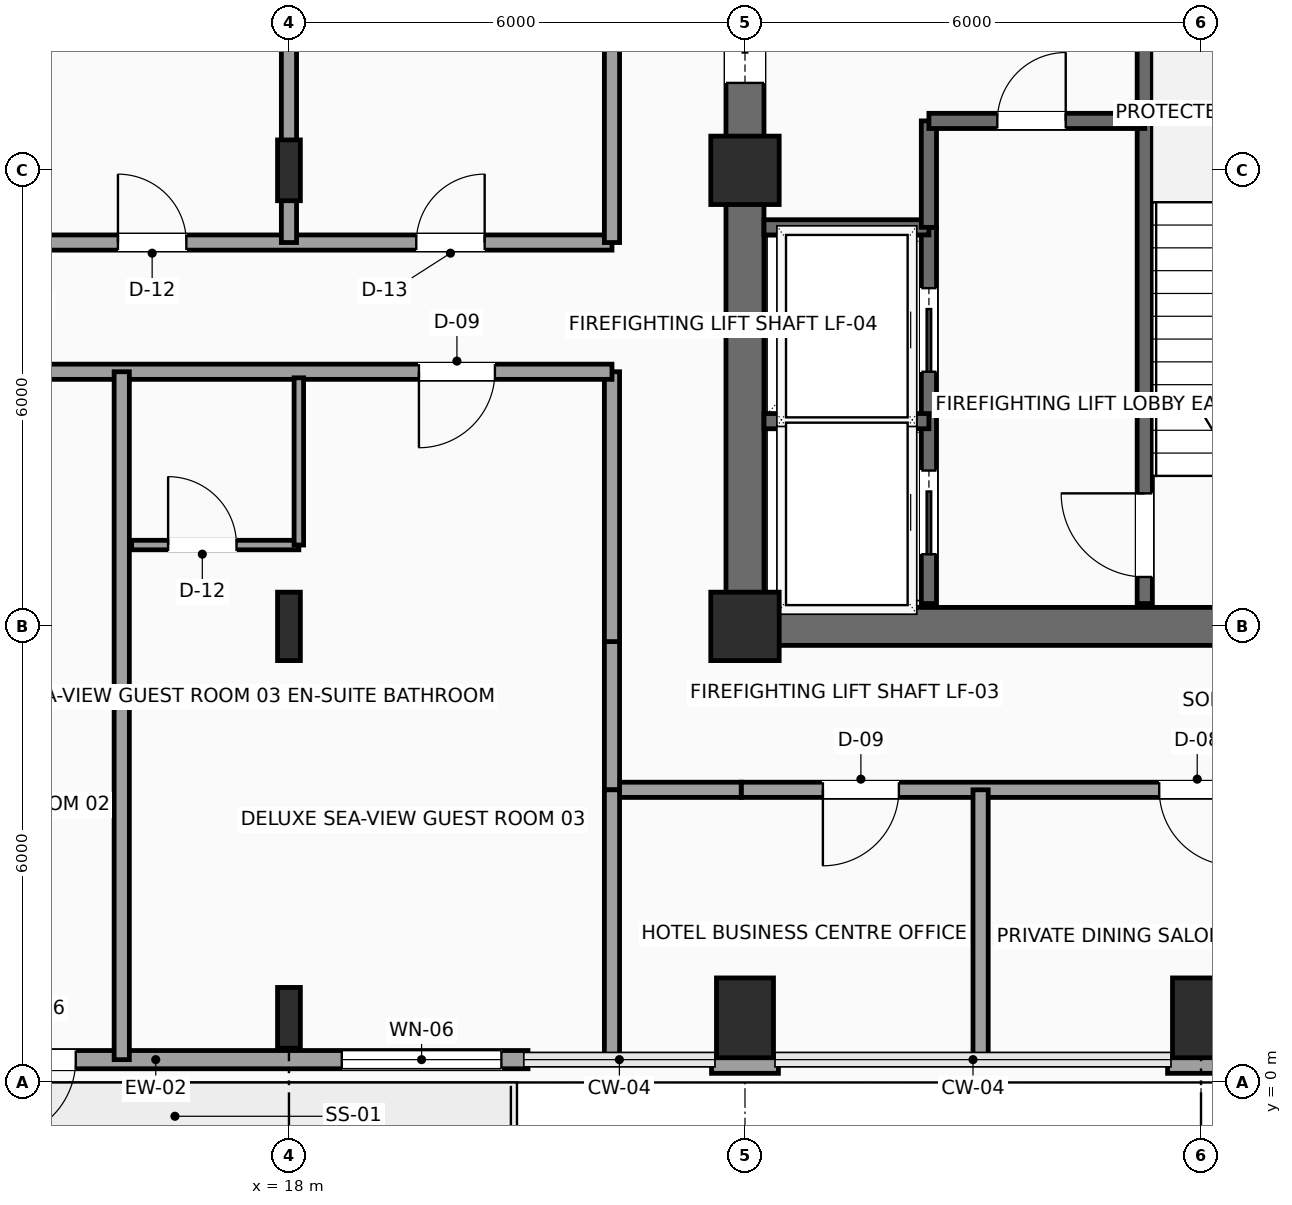
"""IFC4 building model, lengths in metres.
Left out: names, types, materials, properties, quantities, classifications, styles, units other than length and angle.
Written with IfcOpenShell. Run it as: python <this file> out.ifc"""

import sys

from ifc_helpers import new_model, si_unit, direction, frame, frame_2d, origin, origin_2d, place, context, subcontext, project, spatial, rectangle, i_section, extrude, element, fill, save


model = new_model("IFC4")
c1 = context("Model", 3, precision=1e-05, world=origin(), true_north=direction((0.0, 1.0)))
c2 = subcontext(c1, "Body", "Model", "MODEL_VIEW")
j1 = project(units=[si_unit("LENGTHUNIT", "METRE"), si_unit("PLANEANGLEUNIT", "RADIAN")], contexts=[c1])
p1 = place(None, origin())
s1 = spatial("IfcSite", under=j1, at=p1, CompositionType="ELEMENT")
p2 = place(p1, origin())
s2 = spatial("IfcBuilding", under=s1, at=p2, CompositionType="ELEMENT")
p3 = place(p2, frame((0.0, 0.0, 172.95)))
s3 = spatial("IfcBuildingStorey", under=s2, at=p3, CompositionType="ELEMENT", Elevation=172.95)
for number, where, z_axis, x_axis in (
    (1, (24.0, 6.0, 0.0), (0.0, 0.0, 1.0), (1.0, 0.0, 0.0)),
    (2, (24.0, 12.0, 0.0), (0.0, 0.0, 1.0), (1.0, 0.0, 0.0)),
):
    element("IfcColumn", number, at=place(p3, frame(where, z_axis=z_axis, x_axis=x_axis)), inside=s3, PredefinedType="COLUMN", context=c2, shape_type="SweptSolid", body=[
        extrude(rectangle(XDim=0.9, YDim=0.9, at=origin_2d()), origin(), (0.0, 0.0, 1.0), 3.75),
    ])
p4 = place(p3, frame((18.0, 0.85, 0.0), z_axis=(0.0, 0.0, 1.0), x_axis=(1.0, 0.0, 0.0)))
e3 = element("IfcColumn", 3, at=p4, inside=s3, PredefinedType="COLUMN", context=c2, shape_type="SweptSolid", body=[
    extrude(i_section(OverallWidth=0.3, OverallDepth=0.8, WebThickness=0.018, FlangeThickness=0.033, FilletRadius=0.03, at=origin_2d()), origin(), (0.0, 0.0, 1.0), 3.75),
])
p5 = place(p3, frame((18.0, 6.0, 0.0), z_axis=(0.0, 0.0, 1.0), x_axis=(1.0, 0.0, 0.0)))
e4 = element("IfcColumn", 4, at=p5, inside=s3, PredefinedType="COLUMN", context=c2, shape_type="SweptSolid", body=[
    extrude(i_section(OverallWidth=0.3, OverallDepth=0.9, WebThickness=0.019, FlangeThickness=0.035, FilletRadius=0.03, at=origin_2d()), origin(), (0.0, 0.0, 1.0), 3.75),
])
p6 = place(p3, frame((18.0, 12.0, 0.0), z_axis=(0.0, 0.0, 1.0), x_axis=(1.0, 0.0, 0.0)))
e5 = element("IfcColumn", 5, at=p6, inside=s3, PredefinedType="COLUMN", context=c2, shape_type="SweptSolid", body=[
    extrude(i_section(OverallWidth=0.3, OverallDepth=0.8, WebThickness=0.018, FlangeThickness=0.033, FilletRadius=0.03, at=origin_2d()), origin(), (0.0, 0.0, 1.0), 3.75),
])
for number, where, z_axis, x_axis in (
    (6, (24.0, 0.85, 0.0), (0.0, 0.0, 1.0), (1.0, 0.0, 0.0)),
    (7, (30.0, 0.85, 0.0), (0.0, 0.0, 1.0), (1.0, 0.0, 0.0)),
):
    element("IfcColumn", number, at=place(p3, frame(where, z_axis=z_axis, x_axis=x_axis)), inside=s3, PredefinedType="COLUMN", context=c2, shape_type="SweptSolid", body=[
        extrude(rectangle(XDim=0.75, YDim=1.05, at=origin_2d()), origin(), (0.0, 0.0, 1.0), 3.75),
    ])
p7 = place(p3, frame((21.145, 0.3, 0.0), z_axis=(0.0, 0.0, 1.0), x_axis=(-1.0, 0.0, 0.0)))
e8 = element("IfcWall", 8, at=p7, inside=s3, PredefinedType="SOLIDWALL", context=c2, shape_type="SweptSolid", body=[
    extrude(rectangle(XDim=9.29, YDim=0.24, at=frame_2d((4.645, 0.0))), origin(), (0.0, 0.0, 1.0), 3.54),
])
p8 = place(p7, frame((5.95, 0.0, 0.0)))
e9 = element("IfcOpeningElement", 9, at=p8, cuts=e8, PredefinedType="OPENING", context=c2, shape_type="SweptSolid", body=[
    extrude(rectangle(XDim=1.05, YDim=2.2, at=frame_2d((0.525, 1.1))), frame((0.0, 0.13, 0.0), z_axis=(0.0, -1.0, 0.0), x_axis=(1.0, 0.0, 0.0)), (0.0, 0.0, 1.0), 0.26),
])
p9 = place(p7, frame((0.35, 0.0, 0.85)))
e10 = element("IfcOpeningElement", 10, at=p9, cuts=e8, PredefinedType="OPENING", context=c2, shape_type="SweptSolid", body=[
    extrude(rectangle(XDim=2.1, YDim=2.2, at=frame_2d((1.05, 1.1))), frame((0.0, 0.13, 0.0), z_axis=(0.0, -1.0, 0.0), x_axis=(1.0, 0.0, 0.0)), (0.0, 0.0, 1.0), 0.26),
])
for number, where, z_axis, x_axis in (
    (11, (30.44, 0.24, 0.0), (0.0, 0.0, 1.0), (-1.0, 0.0, 0.0)),
    (12, (24.44, 0.24, 0.0), (0.0, 0.0, 1.0), (-1.0, 0.0, 0.0)),
):
    element("IfcWall", number, at=place(p3, frame(where, z_axis=z_axis, x_axis=x_axis)), inside=s3, PredefinedType="SOLIDWALL", context=c2, shape_type="SweptSolid", body=[
        extrude(rectangle(XDim=0.88, YDim=0.24, at=frame_2d((0.44, 0.0))), origin(), (0.0, 0.0, 1.0), 3.54),
    ])
p10 = place(p3, frame((24.0, 6.0, 0.0), z_axis=(0.0, 0.0, 1.0), x_axis=(1.0, 0.0, 0.0)))
e13 = element("IfcWall", 13, at=p10, inside=s3, PredefinedType="SHEAR", context=c2, shape_type="SweptSolid", body=[
    extrude(rectangle(XDim=9.6, YDim=0.5, at=frame_2d((4.8, 0.0))), origin(), (0.0, 0.0, 1.0), 3.54),
])
p11 = place(p3, frame((24.0, 6.0, 0.0), z_axis=(0.0, 0.0, 1.0), x_axis=(0.0, 1.0, 0.0)))
e14 = element("IfcWall", 14, at=p11, inside=s3, PredefinedType="SHEAR", context=c2, shape_type="SweptSolid", body=[
    extrude(rectangle(XDim=12.0, YDim=0.5, at=frame_2d((6.0, 0.0))), origin(), (0.0, 0.0, 1.0), 3.54),
])
p12 = place(p11, frame((7.15, 0.0, 0.0)))
e15 = element("IfcOpeningElement", 15, at=p12, cuts=e14, PredefinedType="OPENING", context=c2, shape_type="SweptSolid", body=[
    extrude(rectangle(XDim=1.6, YDim=2.3, at=frame_2d((0.8, 1.15))), frame((0.0, 0.26, 0.0), z_axis=(0.0, -1.0, 0.0), x_axis=(1.0, 0.0, 0.0)), (0.0, 0.0, 1.0), 0.52),
])
p13 = place(p3, frame((29.26, 6.3, 0.0), z_axis=(0.0, 0.0, 1.0), x_axis=(0.0, 1.0, 0.0)))
e16 = element("IfcWall", 16, at=p13, inside=s3, PredefinedType="SHEAR", context=c2, shape_type="SweptSolid", body=[
    extrude(rectangle(XDim=8.88, YDim=0.2, at=frame_2d((4.44, 0.0))), origin(), (0.0, 0.0, 1.0), 3.54),
])
p14 = place(p13, frame((0.35, 0.0, 0.0)))
e17 = element("IfcOpeningElement", 17, at=p14, cuts=e16, PredefinedType="OPENING", context=c2, shape_type="SweptSolid", body=[
    extrude(rectangle(XDim=1.1, YDim=2.2, at=frame_2d((0.55, 1.1))), frame((0.0, 0.11, 0.0), z_axis=(0.0, -1.0, 0.0), x_axis=(1.0, 0.0, 0.0)), (0.0, 0.0, 1.0), 0.22),
])
p15 = place(p3, frame((26.42, 6.3, 0.0), z_axis=(0.0, 0.0, 1.0), x_axis=(0.0, 1.0, 0.0)))
e18 = element("IfcWall", 18, at=p15, inside=s3, PredefinedType="SHEAR", context=c2, shape_type="SweptSolid", body=[
    extrude(rectangle(XDim=4.95, YDim=0.2, at=frame_2d((2.475, 0.0))), origin(), (0.0, 0.0, 1.0), 3.54),
])
p16 = place(p15, frame((0.65, 0.0, 0.0)))
e19 = element("IfcOpeningElement", 19, at=p16, cuts=e18, PredefinedType="OPENING", context=c2, shape_type="SweptSolid", body=[
    extrude(rectangle(XDim=1.1, YDim=2.2, at=frame_2d((0.55, 1.1))), frame((0.0, 0.11, 0.0), z_axis=(0.0, -1.0, 0.0), x_axis=(1.0, 0.0, 0.0)), (0.0, 0.0, 1.0), 0.22),
])
p17 = place(p15, frame((3.05, 0.0, 0.0)))
e20 = element("IfcOpeningElement", 20, at=p17, cuts=e18, PredefinedType="OPENING", context=c2, shape_type="SweptSolid", body=[
    extrude(rectangle(XDim=1.1, YDim=2.2, at=frame_2d((0.55, 1.1))), frame((0.0, 0.11, 0.0), z_axis=(0.0, -1.0, 0.0), x_axis=(1.0, 0.0, 0.0)), (0.0, 0.0, 1.0), 0.22),
])
for number, where, z_axis, x_axis in (
    (21, (24.25, 8.7, 0.0), (0.0, 0.0, 1.0), (1.0, 0.0, 0.0)),
    (22, (24.25, 11.25, 0.0), (0.0, 0.0, 1.0), (1.0, 0.0, 0.0)),
):
    element("IfcWall", number, at=place(p3, frame(where, z_axis=z_axis, x_axis=x_axis)), inside=s3, PredefinedType="SHEAR", context=c2, shape_type="SweptSolid", body=[
        extrude(rectangle(XDim=2.17, YDim=0.2, at=frame_2d((1.085, 0.0))), origin(), (0.0, 0.0, 1.0), 3.54),
    ])
p18 = place(p3, frame((26.42, 11.25, 0.0), z_axis=(0.0, 0.0, 1.0), x_axis=(0.0, 1.0, 0.0)))
e23 = element("IfcWall", 23, at=p18, inside=s3, PredefinedType="SHEAR", context=c2, shape_type="SweptSolid", body=[
    extrude(rectangle(XDim=1.4, YDim=0.2, at=frame_2d((0.7, 0.0))), origin(), (0.0, 0.0, 1.0), 3.54),
])
p19 = place(p3, frame((26.42, 12.65, 0.0), z_axis=(0.0, 0.0, 1.0), x_axis=(1.0, 0.0, 0.0)))
e24 = element("IfcWall", 24, at=p19, inside=s3, PredefinedType="SHEAR", context=c2, shape_type="SweptSolid", body=[
    extrude(rectangle(XDim=2.84, YDim=0.2, at=frame_2d((1.42, 0.0))), origin(), (0.0, 0.0, 1.0), 3.54),
])
p20 = place(p19, frame((0.9, 0.0, 0.0)))
e25 = element("IfcOpeningElement", 25, at=p20, cuts=e24, PredefinedType="OPENING", context=c2, shape_type="SweptSolid", body=[
    extrude(rectangle(XDim=0.9, YDim=2.15, at=frame_2d((0.45, 1.075))), frame((0.0, 0.11, 0.0), z_axis=(0.0, -1.0, 0.0), x_axis=(1.0, 0.0, 0.0)), (0.0, 0.0, 1.0), 0.22),
])
p21 = place(p3, frame((36.35, 3.85, 0.0), z_axis=(0.0, 0.0, 1.0), x_axis=(-1.0, 0.0, 0.0)))
e26 = element("IfcWall", 26, at=p21, inside=s3, PredefinedType="PARTITIONING", context=c2, shape_type="SweptSolid", body=[
    extrude(rectangle(XDim=12.4, YDim=0.2, at=frame_2d((6.2, 0.0))), origin(), (0.0, 0.0, 1.0), 3.54),
])
p22 = place(p21, frame((10.325, 0.0, 0.0)))
e27 = element("IfcOpeningElement", 27, at=p22, cuts=e26, PredefinedType="OPENING", context=c2, shape_type="SweptSolid", body=[
    extrude(rectangle(XDim=1.0, YDim=2.2, at=frame_2d((0.5, 1.1))), frame((0.0, 0.11, 0.0), z_axis=(0.0, -1.0, 0.0), x_axis=(1.0, 0.0, 0.0)), (0.0, 0.0, 1.0), 0.22),
])
p23 = place(p21, frame((5.9, 0.0, 0.0)))
e28 = element("IfcOpeningElement", 28, at=p23, cuts=e26, PredefinedType="OPENING", context=c2, shape_type="SweptSolid", body=[
    extrude(rectangle(XDim=1.0, YDim=2.2, at=frame_2d((0.5, 1.1))), frame((0.0, 0.11, 0.0), z_axis=(0.0, -1.0, 0.0), x_axis=(1.0, 0.0, 0.0)), (0.0, 0.0, 1.0), 0.22),
])
p24 = place(p3, frame((23.95, 3.85, 0.0), z_axis=(0.0, 0.0, 1.0), x_axis=(-1.0, 0.0, 0.0)))
e29 = element("IfcWall", 29, at=p24, inside=s3, PredefinedType="PARTITIONING", context=c2, shape_type="SweptSolid", body=[
    extrude(rectangle(XDim=1.7, YDim=0.2, at=frame_2d((0.85, 0.0))), origin(), (0.0, 0.0, 1.0), 3.54),
])
p25 = place(p3, frame((22.25, 3.85, 0.0), z_axis=(0.0, 0.0, 1.0), x_axis=(0.0, 1.0, 0.0)))
e30 = element("IfcWall", 30, at=p25, inside=s3, PredefinedType="PARTITIONING", context=c2, shape_type="SweptSolid", body=[
    extrude(rectangle(XDim=1.95, YDim=0.2, at=frame_2d((0.975, 0.0))), origin(), (0.0, 0.0, 1.0), 3.54),
])
p26 = place(p3, frame((22.25, 5.8, 0.0), z_axis=(0.0, 0.0, 1.0), x_axis=(0.0, 1.0, 0.0)))
e31 = element("IfcWall", 31, at=p26, inside=s3, PredefinedType="PARTITIONING", context=c2, shape_type="SweptSolid", body=[
    extrude(rectangle(XDim=3.55, YDim=0.2, at=frame_2d((1.775, 0.0))), origin(), (0.0, 0.0, 1.0), 3.54),
])
p27 = place(p3, frame((22.25, 9.35, 0.0), z_axis=(0.0, 0.0, 1.0), x_axis=(-1.0, 0.0, 0.0)))
e32 = element("IfcWall", 32, at=p27, inside=s3, PredefinedType="PARTITIONING", context=c2, shape_type="SweptSolid", body=[
    extrude(rectangle(XDim=15.85, YDim=0.2, at=frame_2d((7.925, 0.0))), origin(), (0.0, 0.0, 1.0), 3.54),
])
p28 = place(p27, frame((14.19, 0.0, 0.0)))
e33 = element("IfcOpeningElement", 33, at=p28, cuts=e32, PredefinedType="OPENING", context=c2, shape_type="SweptSolid", body=[
    extrude(rectangle(XDim=1.0, YDim=2.2, at=frame_2d((0.5, 1.1))), frame((0.0, 0.11, 0.0), z_axis=(0.0, -1.0, 0.0), x_axis=(1.0, 0.0, 0.0)), (0.0, 0.0, 1.0), 0.22),
])
p29 = place(p27, frame((8.265, 0.0, 0.0)))
e34 = element("IfcOpeningElement", 34, at=p29, cuts=e32, PredefinedType="OPENING", context=c2, shape_type="SweptSolid", body=[
    extrude(rectangle(XDim=1.0, YDim=2.2, at=frame_2d((0.5, 1.1))), frame((0.0, 0.11, 0.0), z_axis=(0.0, -1.0, 0.0), x_axis=(1.0, 0.0, 0.0)), (0.0, 0.0, 1.0), 0.22),
])
p30 = place(p27, frame((1.54, 0.0, 0.0)))
e35 = element("IfcOpeningElement", 35, at=p30, cuts=e32, PredefinedType="OPENING", context=c2, shape_type="SweptSolid", body=[
    extrude(rectangle(XDim=1.0, YDim=2.2, at=frame_2d((0.5, 1.1))), frame((0.0, 0.11, 0.0), z_axis=(0.0, -1.0, 0.0), x_axis=(1.0, 0.0, 0.0)), (0.0, 0.0, 1.0), 0.22),
])
p31 = place(p3, frame((10.45, 11.05, 0.0), z_axis=(0.0, 0.0, 1.0), x_axis=(1.0, 0.0, 0.0)))
e36 = element("IfcWall", 36, at=p31, inside=s3, PredefinedType="PARTITIONING", context=c2, shape_type="SweptSolid", body=[
    extrude(rectangle(XDim=11.8, YDim=0.2, at=frame_2d((5.9, 0.0))), origin(), (0.0, 0.0, 1.0), 3.54),
])
p32 = place(p31, frame((2.33, 0.0, 0.0)))
e37 = element("IfcOpeningElement", 37, at=p32, cuts=e36, PredefinedType="OPENING", context=c2, shape_type="SweptSolid", body=[
    extrude(rectangle(XDim=1.0, YDim=2.2, at=frame_2d((0.5, 1.1))), frame((0.0, 0.11, 0.0), z_axis=(0.0, -1.0, 0.0), x_axis=(1.0, 0.0, 0.0)), (0.0, 0.0, 1.0), 0.22),
])
p33 = place(p31, frame((5.3, 0.0, 0.0)))
e38 = element("IfcOpeningElement", 38, at=p33, cuts=e36, PredefinedType="OPENING", context=c2, shape_type="SweptSolid", body=[
    extrude(rectangle(XDim=0.9, YDim=2.1, at=frame_2d((0.45, 1.05))), frame((0.0, 0.11, 0.0), z_axis=(0.0, -1.0, 0.0), x_axis=(1.0, 0.0, 0.0)), (0.0, 0.0, 1.0), 0.22),
])
p34 = place(p31, frame((9.225, 0.0, 0.0)))
e39 = element("IfcOpeningElement", 39, at=p34, cuts=e36, PredefinedType="OPENING", context=c2, shape_type="SweptSolid", body=[
    extrude(rectangle(XDim=0.9, YDim=2.1, at=frame_2d((0.45, 1.05))), frame((0.0, 0.11, 0.0), z_axis=(0.0, -1.0, 0.0), x_axis=(1.0, 0.0, 0.0)), (0.0, 0.0, 1.0), 0.22),
])
p35 = place(p3, frame((22.25, 11.05, 0.0), z_axis=(0.0, 0.0, 1.0), x_axis=(0.0, 1.0, 0.0)))
e40 = element("IfcWall", 40, at=p35, inside=s3, PredefinedType="PARTITIONING", context=c2, shape_type="SweptSolid", body=[
    extrude(rectangle(XDim=19.2, YDim=0.2, at=frame_2d((9.6, 0.0))), origin(), (0.0, 0.0, 1.0), 3.54),
])
p36 = place(p3, frame((18.0, 11.05, 0.0), z_axis=(0.0, 0.0, 1.0), x_axis=(0.0, 1.0, 0.0)))
e41 = element("IfcWall", 41, at=p36, inside=s3, PredefinedType="PARTITIONING", context=c2, shape_type="SweptSolid", body=[
    extrude(rectangle(XDim=5.2, YDim=0.2, at=frame_2d((2.6, 0.0))), origin(), (0.0, 0.0, 1.0), 3.132),
])
for number, where, z_axis, x_axis in (
    (42, (22.25, 0.3, 0.0), (0.0, 0.0, 1.0), (0.0, 1.0, 0.0)),
    (43, (27.1, 0.3, 0.0), (0.0, 0.0, 1.0), (0.0, 1.0, 0.0)),
):
    element("IfcWall", number, at=place(p3, frame(where, z_axis=z_axis, x_axis=x_axis)), inside=s3, PredefinedType="PARTITIONING", context=c2, shape_type="SweptSolid", body=[
        extrude(rectangle(XDim=3.55, YDim=0.2, at=frame_2d((1.775, 0.0))), origin(), (0.0, 0.0, 1.0), 3.54),
    ])
p37 = place(p3, frame((15.8, 0.3, 0.0), z_axis=(0.0, 0.0, 1.0), x_axis=(0.0, 1.0, 0.0)))
e44 = element("IfcWall", 44, at=p37, inside=s3, PredefinedType="PARTITIONING", context=c2, shape_type="SweptSolid", body=[
    extrude(rectangle(XDim=9.05, YDim=0.2, at=frame_2d((4.525, 0.0))), origin(), (0.0, 0.0, 1.0), 3.54),
])
p38 = place(p3, frame((15.93, 7.07, 0.0), z_axis=(0.0, 0.0, 1.0), x_axis=(1.0, 0.0, 0.0)))
e45 = element("IfcWall", 45, at=p38, inside=s3, PredefinedType="PARTITIONING", context=c2, shape_type="SweptSolid", body=[
    extrude(rectangle(XDim=2.2, YDim=0.125, at=frame_2d((1.1, 0.0))), origin(), (0.0, 0.0, 1.0), 3.54),
])
p39 = place(p38, frame((0.48, 0.0, 0.0)))
e46 = element("IfcOpeningElement", 46, at=p39, cuts=e45, PredefinedType="OPENING", context=c2, shape_type="SweptSolid", body=[
    extrude(rectangle(XDim=0.9, YDim=2.1, at=frame_2d((0.45, 1.05))), frame((0.0, 0.073, 0.0), z_axis=(0.0, -1.0, 0.0), x_axis=(1.0, 0.0, 0.0)), (0.0, 0.0, 1.0), 0.145),
])
p40 = place(p3, frame((18.13, 7.07, 0.0), z_axis=(0.0, 0.0, 1.0), x_axis=(0.0, 1.0, 0.0)))
e47 = element("IfcWall", 47, at=p40, inside=s3, PredefinedType="PARTITIONING", context=c2, shape_type="SweptSolid", body=[
    extrude(rectangle(XDim=2.2, YDim=0.125, at=frame_2d((1.1, 0.0))), origin(), (0.0, 0.0, 1.0), 3.132),
])
p41 = place(p8, origin())
e48 = element("IfcDoor", 48, at=p41, inside=s3, OperationType="SINGLE_SWING_RIGHT", PredefinedType="DOOR", context=c2, shape_type="SweptSolid", body=[
    extrude(rectangle(XDim=1.05, YDim=2.2, at=frame_2d((0.525, 1.1))), frame((0.0, 0.025, 0.0), z_axis=(0.0, -1.0, 0.0), x_axis=(1.0, 0.0, 0.0)), (0.0, 0.0, 1.0), 0.05),
])
fill(e9, e48)
p42 = place(p9, origin())
e49 = element("IfcWindow", 49, at=p42, inside=s3, PartitioningType="SINGLE_PANEL", PredefinedType="WINDOW", context=c2, shape_type="SweptSolid", body=[
    extrude(rectangle(XDim=2.1, YDim=2.2, at=frame_2d((1.05, 1.1))), frame((0.0, 0.03, 0.0), z_axis=(0.0, -1.0, 0.0), x_axis=(1.0, 0.0, 0.0)), (0.0, 0.0, 1.0), 0.06),
])
fill(e10, e49)
p43 = place(p12, origin())
e50 = element("IfcDoor", 50, at=p43, inside=s3, OperationType="DOUBLE_DOOR_SLIDING", PredefinedType="DOOR", context=c2, shape_type="SweptSolid", body=[
    extrude(rectangle(XDim=1.6, YDim=2.3, at=frame_2d((0.8, 1.15))), frame((0.0, 0.025, 0.0), z_axis=(0.0, -1.0, 0.0), x_axis=(1.0, 0.0, 0.0)), (0.0, 0.0, 1.0), 0.05),
])
fill(e15, e50)
p44 = place(p14, origin())
e51 = element("IfcDoor", 51, at=p44, inside=s3, OperationType="SINGLE_SWING_RIGHT", PredefinedType="DOOR", context=c2, shape_type="SweptSolid", body=[
    extrude(rectangle(XDim=1.1, YDim=2.2, at=frame_2d((0.55, 1.1))), frame((0.0, 0.025, 0.0), z_axis=(0.0, -1.0, 0.0), x_axis=(1.0, 0.0, 0.0)), (0.0, 0.0, 1.0), 0.05),
])
fill(e17, e51)
p45 = place(p16, origin())
e52 = element("IfcDoor", 52, at=p45, inside=s3, OperationType="SLIDING_TO_LEFT", PredefinedType="DOOR", context=c2, shape_type="SweptSolid", body=[
    extrude(rectangle(XDim=1.1, YDim=2.2, at=frame_2d((0.55, 1.1))), frame((0.0, 0.025, 0.0), z_axis=(0.0, -1.0, 0.0), x_axis=(1.0, 0.0, 0.0)), (0.0, 0.0, 1.0), 0.05),
])
fill(e19, e52)
p46 = place(p17, origin())
e53 = element("IfcDoor", 53, at=p46, inside=s3, OperationType="SLIDING_TO_LEFT", PredefinedType="DOOR", context=c2, shape_type="SweptSolid", body=[
    extrude(rectangle(XDim=1.1, YDim=2.2, at=frame_2d((0.55, 1.1))), frame((0.0, 0.025, 0.0), z_axis=(0.0, -1.0, 0.0), x_axis=(1.0, 0.0, 0.0)), (0.0, 0.0, 1.0), 0.05),
])
fill(e20, e53)
p47 = place(p20, origin())
e54 = element("IfcDoor", 54, at=p47, inside=s3, OperationType="SINGLE_SWING_RIGHT", PredefinedType="DOOR", context=c2, shape_type="SweptSolid", body=[
    extrude(rectangle(XDim=0.9, YDim=2.15, at=frame_2d((0.45, 1.075))), frame((0.0, 0.025, 0.0), z_axis=(0.0, -1.0, 0.0), x_axis=(1.0, 0.0, 0.0)), (0.0, 0.0, 1.0), 0.05),
])
fill(e25, e54)
p48 = place(p22, origin())
e55 = element("IfcDoor", 55, at=p48, inside=s3, OperationType="SINGLE_SWING_RIGHT", PredefinedType="DOOR", context=c2, shape_type="SweptSolid", body=[
    extrude(rectangle(XDim=1.0, YDim=2.2, at=frame_2d((0.5, 1.1))), frame((0.0, 0.025, 0.0), z_axis=(0.0, -1.0, 0.0), x_axis=(1.0, 0.0, 0.0)), (0.0, 0.0, 1.0), 0.05),
])
fill(e27, e55)
p49 = place(p23, origin())
e56 = element("IfcDoor", 56, at=p49, inside=s3, OperationType="SINGLE_SWING_LEFT", PredefinedType="DOOR", context=c2, shape_type="SweptSolid", body=[
    extrude(rectangle(XDim=1.0, YDim=2.2, at=frame_2d((0.5, 1.1))), frame((0.0, 0.025, 0.0), z_axis=(0.0, -1.0, 0.0), x_axis=(1.0, 0.0, 0.0)), (0.0, 0.0, 1.0), 0.05),
])
fill(e28, e56)
p50 = place(p30, origin())
e57 = element("IfcDoor", 57, at=p50, inside=s3, OperationType="SINGLE_SWING_RIGHT", PredefinedType="DOOR", context=c2, shape_type="SweptSolid", body=[
    extrude(rectangle(XDim=1.0, YDim=2.2, at=frame_2d((0.5, 1.1))), frame((0.0, 0.025, 0.0), z_axis=(0.0, -1.0, 0.0), x_axis=(1.0, 0.0, 0.0)), (0.0, 0.0, 1.0), 0.05),
])
fill(e35, e57)
p51 = place(p33, origin())
e58 = element("IfcDoor", 58, at=p51, inside=s3, OperationType="SINGLE_SWING_LEFT", PredefinedType="DOOR", context=c2, shape_type="SweptSolid", body=[
    extrude(rectangle(XDim=0.9, YDim=2.1, at=frame_2d((0.45, 1.05))), frame((0.0, 0.025, 0.0), z_axis=(0.0, -1.0, 0.0), x_axis=(1.0, 0.0, 0.0)), (0.0, 0.0, 1.0), 0.05),
])
fill(e38, e58)
p52 = place(p34, origin())
e59 = element("IfcDoor", 59, at=p52, inside=s3, OperationType="SINGLE_SWING_RIGHT", PredefinedType="DOOR", context=c2, shape_type="SweptSolid", body=[
    extrude(rectangle(XDim=0.9, YDim=2.1, at=frame_2d((0.45, 1.05))), frame((0.0, 0.025, 0.0), z_axis=(0.0, -1.0, 0.0), x_axis=(1.0, 0.0, 0.0)), (0.0, 0.0, 1.0), 0.05),
])
fill(e39, e59)
p53 = place(p39, origin())
e60 = element("IfcDoor", 60, at=p53, inside=s3, OperationType="SINGLE_SWING_LEFT", PredefinedType="DOOR", context=c2, shape_type="SweptSolid", body=[
    extrude(rectangle(XDim=0.9, YDim=2.1, at=frame_2d((0.45, 1.05))), frame((0.0, 0.025, 0.0), z_axis=(0.0, -1.0, 0.0), x_axis=(1.0, 0.0, 0.0)), (0.0, 0.0, 1.0), 0.05),
])
fill(e46, e60)
save(model, sys.argv[1])
